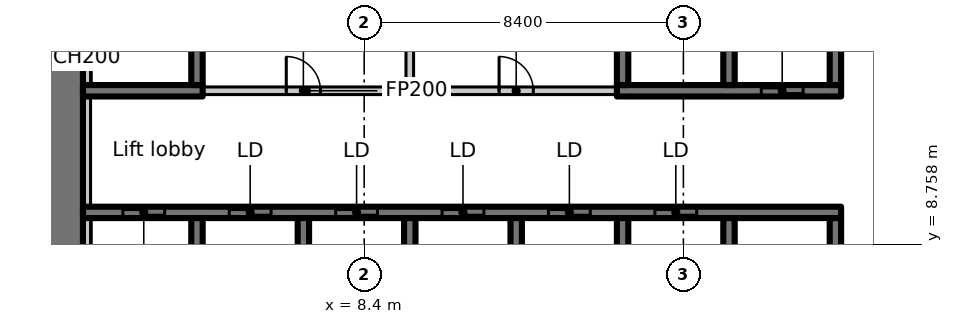
"""IFC4 building model, lengths in metres.
Left out: names, types, materials, properties, quantities, classifications, styles, units other than length and angle.
Written with IfcOpenShell. Run it as: python <this file> out.ifc"""

import sys

from ifc_helpers import new_model, si_unit, direction, frame, frame_2d, origin, place, context, subcontext, project, spatial, rectangle, extrude, element, fill, save


model = new_model("IFC4")
c1 = context("Model", 3, precision=1e-05, world=origin(), true_north=direction((0.0, 1.0)))
c2 = subcontext(c1, "Body", "Model", "MODEL_VIEW")
j1 = project(units=[si_unit("LENGTHUNIT", "METRE"), si_unit("PLANEANGLEUNIT", "RADIAN")], contexts=[c1])
p1 = place(None, origin())
s1 = spatial("IfcSite", under=j1, at=p1, CompositionType="ELEMENT")
p2 = place(p1, origin())
s2 = spatial("IfcBuilding", under=s1, at=p2, CompositionType="ELEMENT")
p3 = place(p2, frame((0.0, 0.0, 68.9)))
s3 = spatial("IfcBuildingStorey", under=s2, at=p3, CompositionType="ELEMENT", Elevation=68.9)
p4 = place(p3, frame((0.5, 6.936, 0.0), z_axis=(0.0, 0.0, 1.0), x_axis=(0.0, 1.0, 0.0)))
e1 = element("IfcWall", 1, at=p4, inside=s3, PredefinedType="SHEAR", context=c2, shape_type="SweptSolid", body=[
    extrude(rectangle(XDim=8.864, YDim=1.0, at=frame_2d((4.432, 0.0))), origin(), (0.0, 0.0, 1.0), 3.35),
])
p5 = place(p3, frame((1.0, 9.6, 0.0), z_axis=(0.0, 0.0, 1.0), x_axis=(1.0, 0.0, 0.0)))
e2 = element("IfcWall", 2, at=p5, inside=s3, PredefinedType="SHEAR", context=c2, shape_type="SweptSolid", body=[
    extrude(rectangle(XDim=19.95, YDim=0.3, at=frame_2d((9.975, 0.0))), origin(), (0.0, 0.0, 1.0), 3.35),
])
p6 = place(p5, frame((1.05, 0.0, 0.0)))
e3 = element("IfcOpeningElement", 3, at=p6, cuts=e2, PredefinedType="OPENING", context=c2, shape_type="SweptSolid", body=[
    extrude(rectangle(XDim=1.1, YDim=2.3, at=frame_2d((0.55, 1.15))), frame((0.0, 0.16, 0.0), z_axis=(0.0, -1.0, 0.0), x_axis=(1.0, 0.0, 0.0)), (0.0, 0.0, 1.0), 0.32),
])
p7 = place(p5, frame((3.85, 0.0, 0.0)))
e4 = element("IfcOpeningElement", 4, at=p7, cuts=e2, PredefinedType="OPENING", context=c2, shape_type="SweptSolid", body=[
    extrude(rectangle(XDim=1.1, YDim=2.3, at=frame_2d((0.55, 1.15))), frame((0.0, 0.16, 0.0), z_axis=(0.0, -1.0, 0.0), x_axis=(1.0, 0.0, 0.0)), (0.0, 0.0, 1.0), 0.32),
])
p8 = place(p5, frame((6.65, 0.0, 0.0)))
e5 = element("IfcOpeningElement", 5, at=p8, cuts=e2, PredefinedType="OPENING", context=c2, shape_type="SweptSolid", body=[
    extrude(rectangle(XDim=1.1, YDim=2.3, at=frame_2d((0.55, 1.15))), frame((0.0, 0.16, 0.0), z_axis=(0.0, -1.0, 0.0), x_axis=(1.0, 0.0, 0.0)), (0.0, 0.0, 1.0), 0.32),
])
p9 = place(p5, frame((9.45, 0.0, 0.0)))
e6 = element("IfcOpeningElement", 6, at=p9, cuts=e2, PredefinedType="OPENING", context=c2, shape_type="SweptSolid", body=[
    extrude(rectangle(XDim=1.1, YDim=2.3, at=frame_2d((0.55, 1.15))), frame((0.0, 0.16, 0.0), z_axis=(0.0, -1.0, 0.0), x_axis=(1.0, 0.0, 0.0)), (0.0, 0.0, 1.0), 0.32),
])
p10 = place(p5, frame((12.25, 0.0, 0.0)))
e7 = element("IfcOpeningElement", 7, at=p10, cuts=e2, PredefinedType="OPENING", context=c2, shape_type="SweptSolid", body=[
    extrude(rectangle(XDim=1.1, YDim=2.3, at=frame_2d((0.55, 1.15))), frame((0.0, 0.16, 0.0), z_axis=(0.0, -1.0, 0.0), x_axis=(1.0, 0.0, 0.0)), (0.0, 0.0, 1.0), 0.32),
])
p11 = place(p5, frame((15.05, 0.0, 0.0)))
e8 = element("IfcOpeningElement", 8, at=p11, cuts=e2, PredefinedType="OPENING", context=c2, shape_type="SweptSolid", body=[
    extrude(rectangle(XDim=1.1, YDim=2.3, at=frame_2d((0.55, 1.15))), frame((0.0, 0.16, 0.0), z_axis=(0.0, -1.0, 0.0), x_axis=(1.0, 0.0, 0.0)), (0.0, 0.0, 1.0), 0.32),
])
for number, where, z_axis, x_axis in (
    (9, (4.0, 7.15, 0.0), (0.0, 0.0, 1.0), (0.0, 1.0, 0.0)),
    (10, (6.8, 7.15, 0.0), (0.0, 0.0, 1.0), (0.0, 1.0, 0.0)),
    (11, (9.6, 7.15, 0.0), (0.0, 0.0, 1.0), (0.0, 1.0, 0.0)),
    (12, (12.4, 7.15, 0.0), (0.0, 0.0, 1.0), (0.0, 1.0, 0.0)),
    (13, (15.2, 7.15, 0.0), (0.0, 0.0, 1.0), (0.0, 1.0, 0.0)),
    (14, (18.0, 7.15, 0.0), (0.0, 0.0, 1.0), (0.0, 1.0, 0.0)),
    (15, (20.8, 7.15, 0.0), (0.0, 0.0, 1.0), (0.0, 1.0, 0.0)),
):
    element("IfcWall", number, at=place(p3, frame(where, z_axis=z_axis, x_axis=x_axis)), inside=s3, PredefinedType="SHEAR", context=c2, shape_type="SweptSolid", body=[
        extrude(rectangle(XDim=2.3, YDim=0.3, at=frame_2d((1.15, 0.0))), origin(), (0.0, 0.0, 1.0), 3.35),
    ])
p12 = place(p3, frame((1.0, 12.8, 0.0), z_axis=(0.0, 0.0, 1.0), x_axis=(1.0, 0.0, 0.0)))
e16 = element("IfcWall", 16, at=p12, inside=s3, PredefinedType="SHEAR", context=c2, shape_type="SweptSolid", body=[
    extrude(rectangle(XDim=3.15, YDim=0.3, at=frame_2d((1.575, 0.0))), origin(), (0.0, 0.0, 1.0), 3.35),
])
p13 = place(p3, frame((4.0, 12.95, 0.0), z_axis=(0.0, 0.0, 1.0), x_axis=(0.0, 1.0, 0.0)))
e17 = element("IfcWall", 17, at=p13, inside=s3, PredefinedType="SHEAR", context=c2, shape_type="SweptSolid", body=[
    extrude(rectangle(XDim=2.85, YDim=0.3, at=frame_2d((1.425, 0.0))), origin(), (0.0, 0.0, 1.0), 3.35),
])
p14 = place(p3, frame((15.05, 12.8, 0.0), z_axis=(0.0, 0.0, 1.0), x_axis=(1.0, 0.0, 0.0)))
e18 = element("IfcWall", 18, at=p14, inside=s3, PredefinedType="SHEAR", context=c2, shape_type="SweptSolid", body=[
    extrude(rectangle(XDim=5.9, YDim=0.3, at=frame_2d((2.95, 0.0))), origin(), (0.0, 0.0, 1.0), 3.35),
])
p15 = place(p14, frame((3.8, 0.0, 0.0)))
e19 = element("IfcOpeningElement", 19, at=p15, cuts=e18, PredefinedType="OPENING", context=c2, shape_type="SweptSolid", body=[
    extrude(rectangle(XDim=1.1, YDim=2.3, at=frame_2d((0.55, 1.15))), frame((0.0, 0.16, 0.0), z_axis=(0.0, -1.0, 0.0), x_axis=(1.0, 0.0, 0.0)), (0.0, 0.0, 1.0), 0.32),
])
for number, where, z_axis, x_axis in (
    (20, (15.2, 12.95, 0.0), (0.0, 0.0, 1.0), (0.0, 1.0, 0.0)),
    (21, (18.0, 12.95, 0.0), (0.0, 0.0, 1.0), (0.0, 1.0, 0.0)),
    (22, (20.8, 12.95, 0.0), (0.0, 0.0, 1.0), (0.0, 1.0, 0.0)),
):
    element("IfcWall", number, at=place(p3, frame(where, z_axis=z_axis, x_axis=x_axis)), inside=s3, PredefinedType="SHEAR", context=c2, shape_type="SweptSolid", body=[
        extrude(rectangle(XDim=2.85, YDim=0.3, at=frame_2d((1.425, 0.0))), origin(), (0.0, 0.0, 1.0), 3.35),
    ])
p16 = place(p3, frame((4.162, 12.8, 0.0), z_axis=(0.0, 0.0, 1.0), x_axis=(1.0, 0.0, 0.0)))
e23 = element("IfcWall", 23, at=p16, inside=s3, PredefinedType="PARTITIONING", context=c2, shape_type="SweptSolid", body=[
    extrude(rectangle(XDim=5.438, YDim=0.2, at=frame_2d((2.719, 0.0))), origin(), (0.0, 0.0, 1.0), 3.35),
])
p17 = place(p16, frame((2.188, 0.0, 0.0)))
e24 = element("IfcOpeningElement", 24, at=p17, cuts=e23, PredefinedType="OPENING", context=c2, shape_type="SweptSolid", body=[
    extrude(rectangle(XDim=0.9, YDim=2.1, at=frame_2d((0.45, 1.05))), frame((0.0, 0.11, 0.0), z_axis=(0.0, -1.0, 0.0), x_axis=(1.0, 0.0, 0.0)), (0.0, 0.0, 1.0), 0.22),
])
p18 = place(p3, frame((9.6, 12.8, 0.0), z_axis=(0.0, 0.0, 1.0), x_axis=(1.0, 0.0, 0.0)))
e25 = element("IfcWall", 25, at=p18, inside=s3, PredefinedType="PARTITIONING", context=c2, shape_type="SweptSolid", body=[
    extrude(rectangle(XDim=5.438, YDim=0.2, at=frame_2d((2.719, 0.0))), origin(), (0.0, 0.0, 1.0), 3.35),
])
p19 = place(p18, frame((2.35, 0.0, 0.0)))
e26 = element("IfcOpeningElement", 26, at=p19, cuts=e25, PredefinedType="OPENING", context=c2, shape_type="SweptSolid", body=[
    extrude(rectangle(XDim=0.9, YDim=2.1, at=frame_2d((0.45, 1.05))), frame((0.0, 0.11, 0.0), z_axis=(0.0, -1.0, 0.0), x_axis=(1.0, 0.0, 0.0)), (0.0, 0.0, 1.0), 0.22),
])
p20 = place(p3, frame((9.6, 15.588, 0.0), z_axis=(0.0, 0.0, 1.0), x_axis=(0.0, -1.0, 0.0)))
e27 = element("IfcWall", 27, at=p20, inside=s3, PredefinedType="PARTITIONING", context=c2, shape_type="SweptSolid", body=[
    extrude(rectangle(XDim=2.688, YDim=0.2, at=frame_2d((1.344, 0.0))), origin(), (0.0, 0.0, 1.0), 3.35),
])
p21 = place(p3, frame((1.1, 7.15, 0.0), z_axis=(0.0, 0.0, 1.0), x_axis=(0.0, 1.0, 0.0)))
e28 = element("IfcWall", 28, at=p21, inside=s3, PredefinedType="PARTITIONING", context=c2, shape_type="SweptSolid", body=[
    extrude(rectangle(XDim=2.3, YDim=0.2, at=frame_2d((1.15, 0.0))), origin(), (0.0, 0.0, 1.0), 3.35),
])
p22 = place(p3, frame((1.1, 9.75, 0.0), z_axis=(0.0, 0.0, 1.0), x_axis=(0.0, 1.0, 0.0)))
e29 = element("IfcWall", 29, at=p22, inside=s3, PredefinedType="PARTITIONING", context=c2, shape_type="SweptSolid", body=[
    extrude(rectangle(XDim=2.9, YDim=0.2, at=frame_2d((1.45, 0.0))), origin(), (0.0, 0.0, 1.0), 3.35),
])
p23 = place(p3, frame((1.1, 12.95, 0.0), z_axis=(0.0, 0.0, 1.0), x_axis=(0.0, 1.0, 0.0)))
e30 = element("IfcWall", 30, at=p23, inside=s3, PredefinedType="PARTITIONING", context=c2, shape_type="SweptSolid", body=[
    extrude(rectangle(XDim=2.65, YDim=0.2, at=frame_2d((1.325, 0.0))), origin(), (0.0, 0.0, 1.0), 3.35),
])
p24 = place(p6, origin())
e31 = element("IfcDoor", 31, at=p24, inside=s3, OperationType="SLIDING_TO_LEFT", PredefinedType="DOOR", context=c2, shape_type="SweptSolid", body=[
    extrude(rectangle(XDim=1.1, YDim=2.3, at=frame_2d((0.55, 1.15))), frame((0.0, 0.025, 0.0), z_axis=(0.0, -1.0, 0.0), x_axis=(1.0, 0.0, 0.0)), (0.0, 0.0, 1.0), 0.05),
])
fill(e3, e31)
p25 = place(p7, origin())
e32 = element("IfcDoor", 32, at=p25, inside=s3, OperationType="SLIDING_TO_LEFT", PredefinedType="DOOR", context=c2, shape_type="SweptSolid", body=[
    extrude(rectangle(XDim=1.1, YDim=2.3, at=frame_2d((0.55, 1.15))), frame((0.0, 0.025, 0.0), z_axis=(0.0, -1.0, 0.0), x_axis=(1.0, 0.0, 0.0)), (0.0, 0.0, 1.0), 0.05),
])
fill(e4, e32)
p26 = place(p8, origin())
e33 = element("IfcDoor", 33, at=p26, inside=s3, OperationType="SLIDING_TO_LEFT", PredefinedType="DOOR", context=c2, shape_type="SweptSolid", body=[
    extrude(rectangle(XDim=1.1, YDim=2.3, at=frame_2d((0.55, 1.15))), frame((0.0, 0.025, 0.0), z_axis=(0.0, -1.0, 0.0), x_axis=(1.0, 0.0, 0.0)), (0.0, 0.0, 1.0), 0.05),
])
fill(e5, e33)
p27 = place(p9, origin())
e34 = element("IfcDoor", 34, at=p27, inside=s3, OperationType="SLIDING_TO_LEFT", PredefinedType="DOOR", context=c2, shape_type="SweptSolid", body=[
    extrude(rectangle(XDim=1.1, YDim=2.3, at=frame_2d((0.55, 1.15))), frame((0.0, 0.025, 0.0), z_axis=(0.0, -1.0, 0.0), x_axis=(1.0, 0.0, 0.0)), (0.0, 0.0, 1.0), 0.05),
])
fill(e6, e34)
p28 = place(p10, origin())
e35 = element("IfcDoor", 35, at=p28, inside=s3, OperationType="SLIDING_TO_LEFT", PredefinedType="DOOR", context=c2, shape_type="SweptSolid", body=[
    extrude(rectangle(XDim=1.1, YDim=2.3, at=frame_2d((0.55, 1.15))), frame((0.0, 0.025, 0.0), z_axis=(0.0, -1.0, 0.0), x_axis=(1.0, 0.0, 0.0)), (0.0, 0.0, 1.0), 0.05),
])
fill(e7, e35)
p29 = place(p11, origin())
e36 = element("IfcDoor", 36, at=p29, inside=s3, OperationType="SLIDING_TO_LEFT", PredefinedType="DOOR", context=c2, shape_type="SweptSolid", body=[
    extrude(rectangle(XDim=1.1, YDim=2.3, at=frame_2d((0.55, 1.15))), frame((0.0, 0.025, 0.0), z_axis=(0.0, -1.0, 0.0), x_axis=(1.0, 0.0, 0.0)), (0.0, 0.0, 1.0), 0.05),
])
fill(e8, e36)
p30 = place(p15, origin())
e37 = element("IfcDoor", 37, at=p30, inside=s3, OperationType="SLIDING_TO_LEFT", PredefinedType="DOOR", context=c2, shape_type="SweptSolid", body=[
    extrude(rectangle(XDim=1.1, YDim=2.3, at=frame_2d((0.55, 1.15))), frame((0.0, 0.025, 0.0), z_axis=(0.0, -1.0, 0.0), x_axis=(1.0, 0.0, 0.0)), (0.0, 0.0, 1.0), 0.05),
])
fill(e19, e37)
p31 = place(p17, origin())
e38 = element("IfcDoor", 38, at=p31, inside=s3, OperationType="SINGLE_SWING_LEFT", PredefinedType="DOOR", context=c2, shape_type="SweptSolid", body=[
    extrude(rectangle(XDim=0.9, YDim=2.1, at=frame_2d((0.45, 1.05))), frame((0.0, 0.025, 0.0), z_axis=(0.0, -1.0, 0.0), x_axis=(1.0, 0.0, 0.0)), (0.0, 0.0, 1.0), 0.05),
])
fill(e24, e38)
p32 = place(p19, origin())
e39 = element("IfcDoor", 39, at=p32, inside=s3, OperationType="SINGLE_SWING_RIGHT", PredefinedType="DOOR", context=c2, shape_type="SweptSolid", body=[
    extrude(rectangle(XDim=0.9, YDim=2.1, at=frame_2d((0.45, 1.05))), frame((0.0, 0.025, 0.0), z_axis=(0.0, -1.0, 0.0), x_axis=(1.0, 0.0, 0.0)), (0.0, 0.0, 1.0), 0.05),
])
fill(e26, e39)
save(model, sys.argv[1])
